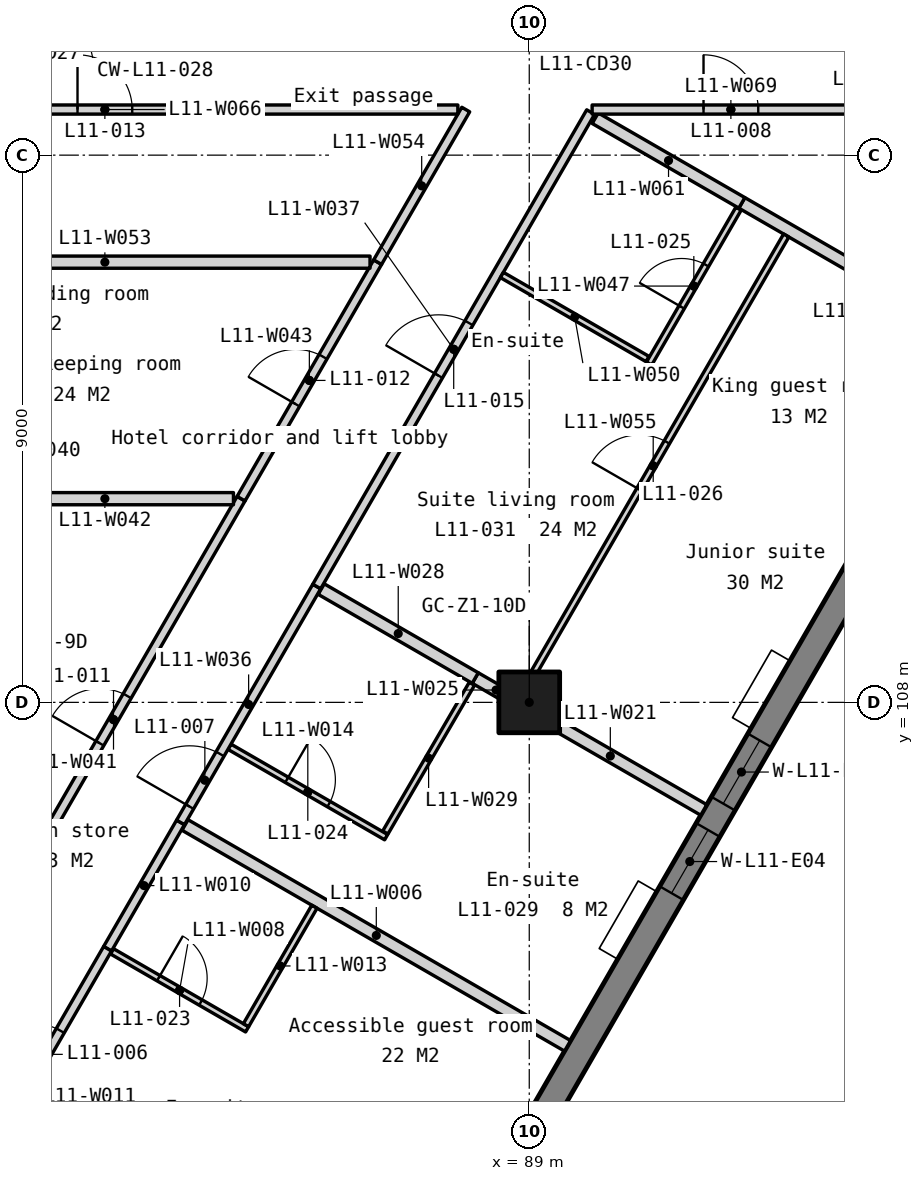
"""IFC4 building model, lengths in metres.
Left out: names, types, materials, properties, quantities, classifications, styles, units other than length and angle.
Written with IfcOpenShell. Run it as: python <this file> out.ifc"""

import sys

from ifc_helpers import new_model, si_unit, direction, frame, frame_2d, origin, origin_2d, place, context, subcontext, project, spatial, polyline, rectangle, outline, extrude, element, fill, save


model = new_model("IFC4")
c1 = context("Model", 3, precision=1e-05, world=origin(), true_north=direction((0.0, 1.0)))
c2 = subcontext(c1, "Body", "Model", "MODEL_VIEW")
j1 = project(units=[si_unit("LENGTHUNIT", "METRE"), si_unit("PLANEANGLEUNIT", "RADIAN")], contexts=[c1])
p1 = place(None, origin())
s1 = spatial("IfcSite", under=j1, at=p1, CompositionType="ELEMENT")
p2 = place(p1, origin())
s2 = spatial("IfcBuilding", under=s1, at=p2, CompositionType="ELEMENT")
p3 = place(p2, frame((0.0, 0.0, 52.5)))
s3 = spatial("IfcBuildingStorey", under=s2, at=p3, CompositionType="ELEMENT", Elevation=52.5)
p4 = place(p3, frame((89.0, 108.0, 0.0), z_axis=(0.0, 0.0, 1.0), x_axis=(1.0, 0.0, 0.0)))
e1 = element("IfcColumn", 1, at=p4, inside=s3, PredefinedType="COLUMN", context=c2, shape_type="SweptSolid", body=[
    extrude(rectangle(XDim=1.0, YDim=1.0, at=origin_2d()), origin(), (0.0, 0.0, 1.0), 3.5),
])
p5 = place(p3, frame((83.105, 90.599, -0.15), z_axis=(0.0, 0.0, 1.0), x_axis=(0.499999201451, 0.866025864826, 0.0)))
e2 = element("IfcWall", 2, at=p5, inside=s3, PredefinedType="SOLIDWALL", context=c2, shape_type="SweptSolid", body=[
    extrude(outline(polyline([(44.8, 0.0), (44.8, 3.5), (0.0, 3.5), (0.0, 0.0), (44.8, 0.0)])), frame((0.0, 0.225, 0.0), z_axis=(0.0, -1.0, 0.0), x_axis=(1.0, 0.0, 0.0)), (0.0, 0.0, 1.0), 0.45),
])
p6 = place(p5, frame((0.722, 0.0, 1.05)))
e3 = element("IfcOpeningElement", 3, at=p6, cuts=e2, PredefinedType="OPENING", context=c2, shape_type="SweptSolid", body=[
    extrude(rectangle(XDim=1.2, YDim=1.5, at=frame_2d((0.6, 0.75))), frame((0.0, 0.235, 0.0), z_axis=(0.0, -1.0, 0.0), x_axis=(1.0, 0.0, 0.0)), (0.0, 0.0, 1.0), 0.47),
])
p7 = place(p5, frame((7.51, 0.0, 1.05)))
e4 = element("IfcOpeningElement", 4, at=p7, cuts=e2, PredefinedType="OPENING", context=c2, shape_type="SweptSolid", body=[
    extrude(rectangle(XDim=1.2, YDim=1.5, at=frame_2d((0.6, 0.75))), frame((0.0, 0.235, 0.0), z_axis=(0.0, -1.0, 0.0), x_axis=(1.0, 0.0, 0.0)), (0.0, 0.0, 1.0), 0.47),
])
p8 = place(p5, frame((9.21, 0.0, 1.05)))
e5 = element("IfcOpeningElement", 5, at=p8, cuts=e2, PredefinedType="OPENING", context=c2, shape_type="SweptSolid", body=[
    extrude(rectangle(XDim=1.2, YDim=1.5, at=frame_2d((0.6, 0.75))), frame((0.0, 0.235, 0.0), z_axis=(0.0, -1.0, 0.0), x_axis=(1.0, 0.0, 0.0)), (0.0, 0.0, 1.0), 0.47),
])
p9 = place(p5, frame((16.47, 0.0, 1.05)))
e6 = element("IfcOpeningElement", 6, at=p9, cuts=e2, PredefinedType="OPENING", context=c2, shape_type="SweptSolid", body=[
    extrude(rectangle(XDim=1.2, YDim=1.5, at=frame_2d((0.6, 0.75))), frame((0.0, 0.235, 0.0), z_axis=(0.0, -1.0, 0.0), x_axis=(1.0, 0.0, 0.0)), (0.0, 0.0, 1.0), 0.47),
])
p10 = place(p5, frame((18.17, 0.0, 1.05)))
e7 = element("IfcOpeningElement", 7, at=p10, cuts=e2, PredefinedType="OPENING", context=c2, shape_type="SweptSolid", body=[
    extrude(rectangle(XDim=1.2, YDim=1.5, at=frame_2d((0.6, 0.75))), frame((0.0, 0.235, 0.0), z_axis=(0.0, -1.0, 0.0), x_axis=(1.0, 0.0, 0.0)), (0.0, 0.0, 1.0), 0.47),
])
p11 = place(p5, frame((25.43, 0.0, 1.05)))
e8 = element("IfcOpeningElement", 8, at=p11, cuts=e2, PredefinedType="OPENING", context=c2, shape_type="SweptSolid", body=[
    extrude(rectangle(XDim=1.2, YDim=1.5, at=frame_2d((0.6, 0.75))), frame((0.0, 0.235, 0.0), z_axis=(0.0, -1.0, 0.0), x_axis=(1.0, 0.0, 0.0)), (0.0, 0.0, 1.0), 0.47),
])
p12 = place(p5, frame((27.13, 0.0, 1.05)))
e9 = element("IfcOpeningElement", 9, at=p12, cuts=e2, PredefinedType="OPENING", context=c2, shape_type="SweptSolid", body=[
    extrude(rectangle(XDim=1.2, YDim=1.5, at=frame_2d((0.6, 0.75))), frame((0.0, 0.235, 0.0), z_axis=(0.0, -1.0, 0.0), x_axis=(1.0, 0.0, 0.0)), (0.0, 0.0, 1.0), 0.47),
])
p13 = place(p5, frame((34.39, 0.0, 1.05)))
e10 = element("IfcOpeningElement", 10, at=p13, cuts=e2, PredefinedType="OPENING", context=c2, shape_type="SweptSolid", body=[
    extrude(rectangle(XDim=1.2, YDim=1.5, at=frame_2d((0.6, 0.75))), frame((0.0, 0.235, 0.0), z_axis=(0.0, -1.0, 0.0), x_axis=(1.0, 0.0, 0.0)), (0.0, 0.0, 1.0), 0.47),
])
p14 = place(p5, frame((36.09, 0.0, 1.05)))
e11 = element("IfcOpeningElement", 11, at=p14, cuts=e2, PredefinedType="OPENING", context=c2, shape_type="SweptSolid", body=[
    extrude(rectangle(XDim=1.2, YDim=1.5, at=frame_2d((0.6, 0.75))), frame((0.0, 0.235, 0.0), z_axis=(0.0, -1.0, 0.0), x_axis=(1.0, 0.0, 0.0)), (0.0, 0.0, 1.0), 0.47),
])
p15 = place(p5, frame((42.878, 0.0, 1.05)))
e12 = element("IfcOpeningElement", 12, at=p15, cuts=e2, PredefinedType="OPENING", context=c2, shape_type="SweptSolid", body=[
    extrude(rectangle(XDim=1.2, YDim=1.5, at=frame_2d((0.6, 0.75))), frame((0.0, 0.235, 0.0), z_axis=(0.0, -1.0, 0.0), x_axis=(1.0, 0.0, 0.0)), (0.0, 0.0, 1.0), 0.47),
])
p16 = place(p3, frame((83.339, 105.983, 0.0), z_axis=(0.0, 0.0, 1.0), x_axis=(0.866023858256, -0.500002676924, 0.0)))
e13 = element("IfcWall", 13, at=p16, inside=s3, PredefinedType="PARTITIONING", context=c2, shape_type="SweptSolid", body=[
    extrude(rectangle(XDim=7.265, YDim=0.2, at=frame_2d((3.633, 0.0))), origin(), (0.0, 0.0, 1.0), 3.35),
])
p17 = place(p3, frame((82.139, 103.905, 0.0), z_axis=(0.0, 0.0, 1.0), x_axis=(0.866014388206, -0.500019079056, 0.0)))
e14 = element("IfcWall", 14, at=p17, inside=s3, PredefinedType="PARTITIONING", context=c2, shape_type="SweptSolid", body=[
    extrude(rectangle(XDim=2.565, YDim=0.1, at=frame_2d((1.282, 0.0))), origin(), (0.0, 0.0, 1.0), 3.35),
])
p18 = place(p17, frame((0.883, 0.0, 0.0)))
e15 = element("IfcOpeningElement", 15, at=p18, cuts=e14, PredefinedType="OPENING", context=c2, shape_type="SweptSolid", body=[
    extrude(rectangle(XDim=0.8, YDim=2.1, at=frame_2d((0.4, 1.05))), frame((0.0, 0.06, 0.0), z_axis=(0.0, -1.0, 0.0), x_axis=(1.0, 0.0, 0.0)), (0.0, 0.0, 1.0), 0.12),
])
p19 = place(p3, frame((82.065, 103.947, 0.0), z_axis=(0.0, 0.0, 1.0), x_axis=(0.500001309137, 0.866024647952, 0.0)))
e16 = element("IfcWall", 16, at=p19, inside=s3, PredefinedType="PARTITIONING", context=c2, shape_type="SweptSolid", body=[
    extrude(rectangle(XDim=2.4, YDim=0.15, at=frame_2d((1.2, 0.0))), origin(), (0.0, 0.0, 1.0), 3.35),
])
p20 = place(p3, frame((80.06, 100.474, 0.0), z_axis=(0.0, 0.0, 1.0), x_axis=(0.499963124258, 0.866046692957, 0.0)))
e17 = element("IfcWall", 17, at=p20, inside=s3, PredefinedType="PARTITIONING", context=c2, shape_type="SweptSolid", body=[
    extrude(rectangle(XDim=4.01, YDim=0.15, at=frame_2d((2.005, 0.0))), origin(), (0.0, 0.0, 1.0), 3.35),
])
p21 = place(p20, frame((1.555, 0.0, 0.0)))
e18 = element("IfcOpeningElement", 18, at=p21, cuts=e17, PredefinedType="OPENING", context=c2, shape_type="SweptSolid", body=[
    extrude(rectangle(XDim=0.9, YDim=2.1, at=frame_2d((0.45, 1.05))), frame((0.0, 0.085, 0.0), z_axis=(0.0, -1.0, 0.0), x_axis=(1.0, 0.0, 0.0)), (0.0, 0.0, 1.0), 0.17),
])
p22 = place(p3, frame((84.342, 102.69, 0.0), z_axis=(0.0, 0.0, 1.0), x_axis=(0.499966648284, 0.866044658551, 0.0)))
e19 = element("IfcWall", 19, at=p22, inside=s3, PredefinedType="PARTITIONING", context=c2, shape_type="SweptSolid", body=[
    extrude(rectangle(XDim=2.25, YDim=0.1, at=frame_2d((1.125, 0.0))), origin(), (0.0, 0.0, 1.0), 3.35),
])
p23 = place(p3, frame((84.07, 107.27, 0.0), z_axis=(0.0, 0.0, 1.0), x_axis=(0.866053027861, -0.499952150643, 0.0)))
e20 = element("IfcWall", 20, at=p23, inside=s3, PredefinedType="PARTITIONING", context=c2, shape_type="SweptSolid", body=[
    extrude(rectangle(XDim=2.975, YDim=0.1, at=frame_2d((1.487, 0.0))), origin(), (0.0, 0.0, 1.0), 3.35),
])
p24 = place(p23, frame((1.087, 0.0, 0.0)))
e21 = element("IfcOpeningElement", 21, at=p24, cuts=e20, PredefinedType="OPENING", context=c2, shape_type="SweptSolid", body=[
    extrude(rectangle(XDim=0.8, YDim=2.1, at=frame_2d((0.4, 1.05))), frame((0.0, 0.06, 0.0), z_axis=(0.0, -1.0, 0.0), x_axis=(1.0, 0.0, 0.0)), (0.0, 0.0, 1.0), 0.12),
])
p25 = place(p3, frame((88.796, 108.005, 0.0), z_axis=(0.0, 0.0, 1.0), x_axis=(0.8660424351, -0.499970499736, 0.0)))
e22 = element("IfcWall", 22, at=p25, inside=s3, PredefinedType="PARTITIONING", context=c2, shape_type="SweptSolid", body=[
    extrude(rectangle(XDim=3.55, YDim=0.2, at=frame_2d((1.775, 0.0))), origin(), (0.0, 0.0, 1.0), 3.35),
])
p26 = place(p3, frame((88.112, 108.4, 0.0), z_axis=(0.0, 0.0, 1.0), x_axis=(0.865989998118, -0.500061319399, 0.0)))
e23 = element("IfcWall", 23, at=p26, inside=s3, PredefinedType="PARTITIONING", context=c2, shape_type="SweptSolid", body=[
    extrude(rectangle(XDim=0.79, YDim=0.2, at=frame_2d((0.395, 0.0))), origin(), (0.0, 0.0, 1.0), 3.35),
])
p27 = place(p3, frame((85.579, 109.863, 0.0), z_axis=(0.0, 0.0, 1.0), x_axis=(0.86601045545, -0.500025890382, 0.0)))
e24 = element("IfcWall", 24, at=p27, inside=s3, PredefinedType="PARTITIONING", context=c2, shape_type="SweptSolid", body=[
    extrude(rectangle(XDim=2.925, YDim=0.2, at=frame_2d((1.462, 0.0))), origin(), (0.0, 0.0, 1.0), 3.35),
])
p28 = place(p3, frame((86.633, 105.859, 0.0), z_axis=(0.0, 0.0, 1.0), x_axis=(0.502878343763, 0.864357201263, 0.0)))
e25 = element("IfcWall", 25, at=p28, inside=s3, PredefinedType="PARTITIONING", context=c2, shape_type="SweptSolid", body=[
    extrude(rectangle(XDim=2.83, YDim=0.1, at=frame_2d((1.415, 0.0))), origin(), (0.0, 0.0, 1.0), 3.35),
])
p29 = place(p3, frame((83.265, 106.026, 0.0), z_axis=(0.0, 0.0, 1.0), x_axis=(0.499989762656, 0.866031314237, 0.0)))
e26 = element("IfcWall", 26, at=p29, inside=s3, PredefinedType="PARTITIONING", context=c2, shape_type="SweptSolid", body=[
    extrude(rectangle(XDim=4.48, YDim=0.15, at=frame_2d((2.24, 0.0))), origin(), (0.0, 0.0, 1.0), 3.35),
])
p30 = place(p29, frame((0.3, 0.0, 0.0)))
e27 = element("IfcOpeningElement", 27, at=p30, cuts=e26, PredefinedType="OPENING", context=c2, shape_type="SweptSolid", body=[
    extrude(rectangle(XDim=1.0, YDim=2.1, at=frame_2d((0.5, 1.05))), frame((0.0, 0.085, 0.0), z_axis=(0.0, -1.0, 0.0), x_axis=(1.0, 0.0, 0.0)), (0.0, 0.0, 1.0), 0.17),
])
p31 = place(p3, frame((85.505, 109.906, 0.0), z_axis=(0.0, 0.0, 1.0), x_axis=(0.500017993482, 0.866015014994, 0.0)))
e28 = element("IfcWall", 28, at=p31, inside=s3, PredefinedType="PARTITIONING", context=c2, shape_type="SweptSolid", body=[
    extrude(rectangle(XDim=9.01, YDim=0.15, at=frame_2d((4.505, 0.0))), origin(), (0.0, 0.0, 1.0), 3.35),
])
p32 = place(p31, frame((4.005, 0.0, 0.0)))
e29 = element("IfcOpeningElement", 29, at=p32, cuts=e28, PredefinedType="OPENING", context=c2, shape_type="SweptSolid", body=[
    extrude(rectangle(XDim=1.0, YDim=2.1, at=frame_2d((0.5, 1.05))), frame((0.0, 0.085, 0.0), z_axis=(0.0, -1.0, 0.0), x_axis=(1.0, 0.0, 0.0)), (0.0, 0.0, 1.0), 0.17),
])
p33 = place(p3, frame((80.065, 104.083, 0.0), z_axis=(0.0, 0.0, 1.0), x_axis=(0.49999109456, 0.866030545282, 0.0)))
e30 = element("IfcWall", 30, at=p33, inside=s3, PredefinedType="PARTITIONING", context=c2, shape_type="SweptSolid", body=[
    extrude(rectangle(XDim=8.391, YDim=0.15, at=frame_2d((4.196, 0.0))), origin(), (0.0, 0.0, 1.0), 3.35),
])
p34 = place(p33, frame((3.746, 0.0, 0.0)))
e31 = element("IfcOpeningElement", 31, at=p34, cuts=e30, PredefinedType="OPENING", context=c2, shape_type="SweptSolid", body=[
    extrude(rectangle(XDim=0.9, YDim=2.1, at=frame_2d((0.45, 1.05))), frame((0.0, 0.085, 0.0), z_axis=(0.0, -1.0, 0.0), x_axis=(1.0, 0.0, 0.0)), (0.0, 0.0, 1.0), 0.17),
])
p35 = place(p3, frame((79.906, 111.35, 0.0), z_axis=(0.0, 0.0, 1.0), x_axis=(1.0, 0.0, 0.0)))
e32 = element("IfcWall", 32, at=p35, inside=s3, PredefinedType="PARTITIONING", context=c2, shape_type="SweptSolid", body=[
    extrude(rectangle(XDim=4.229, YDim=0.2, at=frame_2d((2.115, 0.0))), origin(), (0.0, 0.0, 1.0), 3.35),
])
p36 = place(p3, frame((84.26, 111.35, 0.0), z_axis=(0.0, 0.0, 1.0), x_axis=(0.500003186274, 0.866023564181, 0.0)))
e33 = element("IfcWall", 33, at=p36, inside=s3, PredefinedType="PARTITIONING", context=c2, shape_type="SweptSolid", body=[
    extrude(rectangle(XDim=4.492, YDim=0.15, at=frame_2d((2.246, 0.0))), origin(), (0.0, 0.0, 1.0), 3.35),
])
p37 = place(p36, frame((1.796, 0.0, 0.0)))
e34 = element("IfcOpeningElement", 34, at=p37, cuts=e33, PredefinedType="OPENING", context=c2, shape_type="SweptSolid", body=[
    extrude(rectangle(XDim=0.9, YDim=2.1, at=frame_2d((0.45, 1.05))), frame((0.0, 0.085, 0.0), z_axis=(0.0, -1.0, 0.0), x_axis=(1.0, 0.0, 0.0)), (0.0, 0.0, 1.0), 0.17),
])
p38 = place(p3, frame((90.971, 113.574, 0.0), z_axis=(0.0, 0.0, 1.0), x_axis=(0.499988418424, 0.866032090307, 0.0)))
e35 = element("IfcWall", 35, at=p38, inside=s3, PredefinedType="PARTITIONING", context=c2, shape_type="SweptSolid", body=[
    extrude(rectangle(XDim=2.94, YDim=0.1, at=frame_2d((1.47, 0.0))), origin(), (0.0, 0.0, 1.0), 3.35),
])
p39 = place(p38, frame((1.07, 0.0, 0.0)))
e36 = element("IfcOpeningElement", 36, at=p39, cuts=e35, PredefinedType="OPENING", context=c2, shape_type="SweptSolid", body=[
    extrude(rectangle(XDim=0.8, YDim=2.1, at=frame_2d((0.4, 1.05))), frame((0.0, 0.06, 0.0), z_axis=(0.0, -1.0, 0.0), x_axis=(1.0, 0.0, 0.0)), (0.0, 0.0, 1.0), 0.12),
])
p40 = place(p3, frame((92.497, 116.215, 0.0), z_axis=(0.0, 0.0, 1.0), x_axis=(0.866012907634, -0.500021643343, 0.0)))
e37 = element("IfcWall", 37, at=p40, inside=s3, PredefinedType="PARTITIONING", context=c2, shape_type="SweptSolid", body=[
    extrude(rectangle(XDim=4.45, YDim=0.2, at=frame_2d((2.225, 0.0))), origin(), (0.0, 0.0, 1.0), 3.35),
])
p41 = place(p3, frame((88.55, 115.03, 0.0), z_axis=(0.0, 0.0, 1.0), x_axis=(0.866012076814, -0.50002308228, 0.0)))
e38 = element("IfcWall", 38, at=p41, inside=s3, PredefinedType="PARTITIONING", context=c2, shape_type="SweptSolid", body=[
    extrude(rectangle(XDim=2.765, YDim=0.1, at=frame_2d((1.382, 0.0))), origin(), (0.0, 0.0, 1.0), 3.35),
])
p42 = place(p3, frame((77.66, 115.24, 0.0), z_axis=(0.0, 0.0, 1.0), x_axis=(1.0, 0.0, 0.0)))
e39 = element("IfcWall", 39, at=p42, inside=s3, PredefinedType="PARTITIONING", context=c2, shape_type="SweptSolid", body=[
    extrude(rectangle(XDim=8.721, YDim=0.2, at=frame_2d((4.361, 0.0))), origin(), (0.0, 0.0, 1.0), 3.35),
])
p43 = place(p3, frame((86.506, 115.24, 0.0), z_axis=(0.0, 0.0, 1.0), x_axis=(0.500016544581, 0.866015851556, 0.0)))
e40 = element("IfcWall", 40, at=p43, inside=s3, PredefinedType="PARTITIONING", context=c2, shape_type="SweptSolid", body=[
    extrude(rectangle(XDim=2.898, YDim=0.15, at=frame_2d((1.449, 0.0))), origin(), (0.0, 0.0, 1.0), 3.35),
])
p44 = place(p3, frame((88.851, 108.101, 0.0), z_axis=(0.0, 0.0, 1.0), x_axis=(0.500004234368, 0.866022959057, 0.0)))
e41 = element("IfcWall", 41, at=p44, inside=s3, PredefinedType="PARTITIONING", context=c2, shape_type="SweptSolid", body=[
    extrude(rectangle(XDim=8.75, YDim=0.1, at=frame_2d((4.375, 0.0))), origin(), (0.0, 0.0, 1.0), 3.35),
])
p45 = place(p44, frame((3.925, 0.0, 0.0)))
e42 = element("IfcOpeningElement", 42, at=p45, cuts=e41, PredefinedType="OPENING", context=c2, shape_type="SweptSolid", body=[
    extrude(rectangle(XDim=0.9, YDim=2.1, at=frame_2d((0.45, 1.05))), frame((0.0, 0.06, 0.0), z_axis=(0.0, -1.0, 0.0), x_axis=(1.0, 0.0, 0.0)), (0.0, 0.0, 1.0), 0.12),
])
p46 = place(p3, frame((90.085, 117.608, 0.0), z_axis=(0.0, 0.0, 1.0), x_axis=(0.866011863948, -0.500023450952, 0.0)))
e43 = element("IfcWall", 43, at=p46, inside=s3, PredefinedType="PARTITIONING", context=c2, shape_type="SweptSolid", body=[
    extrude(rectangle(XDim=2.785, YDim=0.2, at=frame_2d((1.393, 0.0))), origin(), (0.0, 0.0, 1.0), 3.35),
])
p47 = place(p3, frame((76.216, 117.75, 0.0), z_axis=(0.0, 0.0, 1.0), x_axis=(1.0, 0.0, 0.0)))
e44 = element("IfcWall", 44, at=p47, inside=s3, PredefinedType="PARTITIONING", context=c2, shape_type="SweptSolid", body=[
    extrude(rectangle(XDim=11.61, YDim=0.15, at=frame_2d((5.805, 0.0))), origin(), (0.0, 0.0, 1.0), 2.938),
])
p48 = place(p47, frame((5.355, 0.0, 0.0)))
e45 = element("IfcOpeningElement", 45, at=p48, cuts=e44, PredefinedType="OPENING", context=c2, shape_type="SweptSolid", body=[
    extrude(rectangle(XDim=0.9, YDim=2.1, at=frame_2d((0.45, 1.05))), frame((0.0, 0.085, 0.0), z_axis=(0.0, -1.0, 0.0), x_axis=(1.0, 0.0, 0.0)), (0.0, 0.0, 1.0), 0.17),
])
p49 = place(p3, frame((90.034, 117.75, 0.0), z_axis=(0.0, 0.0, 1.0), x_axis=(1.0, 0.0, 0.0)))
e46 = element("IfcWall", 46, at=p49, inside=s3, PredefinedType="PARTITIONING", context=c2, shape_type="SweptSolid", body=[
    extrude(rectangle(XDim=4.564, YDim=0.15, at=frame_2d((2.282, 0.0))), origin(), (0.0, 0.0, 1.0), 3.35),
])
p50 = place(p49, frame((1.832, 0.0, 0.0)))
e47 = element("IfcOpeningElement", 47, at=p50, cuts=e46, PredefinedType="OPENING", context=c2, shape_type="SweptSolid", body=[
    extrude(rectangle(XDim=0.9, YDim=2.1, at=frame_2d((0.45, 1.05))), frame((0.0, 0.085, 0.0), z_axis=(0.0, -1.0, 0.0), x_axis=(1.0, 0.0, 0.0)), (0.0, 0.0, 1.0), 0.17),
])
p51 = place(p9, origin())
e48 = element("IfcWindow", 48, at=p51, inside=s3, PartitioningType="SINGLE_PANEL", PredefinedType="WINDOW", context=c2, shape_type="SweptSolid", body=[
    extrude(rectangle(XDim=1.2, YDim=1.5, at=frame_2d((0.6, 0.75))), frame((0.0, 0.03, 0.0), z_axis=(0.0, -1.0, 0.0), x_axis=(1.0, 0.0, 0.0)), (0.0, 0.0, 1.0), 0.06),
])
fill(e6, e48)
p52 = place(p10, origin())
e49 = element("IfcWindow", 49, at=p52, inside=s3, PartitioningType="SINGLE_PANEL", PredefinedType="WINDOW", context=c2, shape_type="SweptSolid", body=[
    extrude(rectangle(XDim=1.2, YDim=1.5, at=frame_2d((0.6, 0.75))), frame((0.0, 0.03, 0.0), z_axis=(0.0, -1.0, 0.0), x_axis=(1.0, 0.0, 0.0)), (0.0, 0.0, 1.0), 0.06),
])
fill(e7, e49)
p53 = place(p21, origin())
e50 = element("IfcDoor", 50, at=p53, inside=s3, OperationType="SINGLE_SWING_LEFT", PredefinedType="DOOR", context=c2, shape_type="SweptSolid", body=[
    extrude(rectangle(XDim=0.9, YDim=2.1, at=frame_2d((0.45, 1.05))), frame((0.0, 0.025, 0.0), z_axis=(0.0, -1.0, 0.0), x_axis=(1.0, 0.0, 0.0)), (0.0, 0.0, 1.0), 0.05),
])
fill(e18, e50)
p54 = place(p30, origin())
e51 = element("IfcDoor", 51, at=p54, inside=s3, OperationType="SINGLE_SWING_LEFT", PredefinedType="DOOR", context=c2, shape_type="SweptSolid", body=[
    extrude(rectangle(XDim=1.0, YDim=2.1, at=frame_2d((0.5, 1.05))), frame((0.0, 0.025, 0.0), z_axis=(0.0, -1.0, 0.0), x_axis=(1.0, 0.0, 0.0)), (0.0, 0.0, 1.0), 0.05),
])
fill(e27, e51)
p55 = place(p50, origin())
e52 = element("IfcDoor", 52, at=p55, inside=s3, OperationType="SINGLE_SWING_LEFT", PredefinedType="DOOR", context=c2, shape_type="SweptSolid", body=[
    extrude(rectangle(XDim=0.9, YDim=2.1, at=frame_2d((0.45, 1.05))), frame((0.0, 0.025, 0.0), z_axis=(0.0, -1.0, 0.0), x_axis=(1.0, 0.0, 0.0)), (0.0, 0.0, 1.0), 0.05),
])
fill(e47, e52)
p56 = place(p34, origin())
e53 = element("IfcDoor", 53, at=p56, inside=s3, OperationType="SINGLE_SWING_LEFT", PredefinedType="DOOR", context=c2, shape_type="SweptSolid", body=[
    extrude(rectangle(XDim=0.9, YDim=2.1, at=frame_2d((0.45, 1.05))), frame((0.0, 0.025, 0.0), z_axis=(0.0, -1.0, 0.0), x_axis=(1.0, 0.0, 0.0)), (0.0, 0.0, 1.0), 0.05),
])
fill(e31, e53)
p57 = place(p37, origin())
e54 = element("IfcDoor", 54, at=p57, inside=s3, OperationType="SINGLE_SWING_LEFT", PredefinedType="DOOR", context=c2, shape_type="SweptSolid", body=[
    extrude(rectangle(XDim=0.9, YDim=2.1, at=frame_2d((0.45, 1.05))), frame((0.0, 0.025, 0.0), z_axis=(0.0, -1.0, 0.0), x_axis=(1.0, 0.0, 0.0)), (0.0, 0.0, 1.0), 0.05),
])
fill(e34, e54)
p58 = place(p48, origin())
e55 = element("IfcDoor", 55, at=p58, inside=s3, OperationType="SINGLE_SWING_LEFT", PredefinedType="DOOR", context=c2, shape_type="SweptSolid", body=[
    extrude(rectangle(XDim=0.9, YDim=2.1, at=frame_2d((0.45, 1.05))), frame((0.0, 0.025, 0.0), z_axis=(0.0, -1.0, 0.0), x_axis=(1.0, 0.0, 0.0)), (0.0, 0.0, 1.0), 0.05),
])
fill(e45, e55)
p59 = place(p32, origin())
e56 = element("IfcDoor", 56, at=p59, inside=s3, OperationType="SINGLE_SWING_LEFT", PredefinedType="DOOR", context=c2, shape_type="SweptSolid", body=[
    extrude(rectangle(XDim=1.0, YDim=2.1, at=frame_2d((0.5, 1.05))), frame((0.0, 0.025, 0.0), z_axis=(0.0, -1.0, 0.0), x_axis=(1.0, 0.0, 0.0)), (0.0, 0.0, 1.0), 0.05),
])
fill(e29, e56)
p60 = place(p18, origin())
e57 = element("IfcDoor", 57, at=p60, inside=s3, OperationType="SINGLE_SWING_LEFT", PredefinedType="DOOR", context=c2, shape_type="SweptSolid", body=[
    extrude(rectangle(XDim=0.8, YDim=2.1, at=frame_2d((0.4, 1.05))), frame((0.0, 0.025, 0.0), z_axis=(0.0, -1.0, 0.0), x_axis=(1.0, 0.0, 0.0)), (0.0, 0.0, 1.0), 0.05),
])
fill(e15, e57)
p61 = place(p24, origin())
e58 = element("IfcDoor", 58, at=p61, inside=s3, OperationType="SINGLE_SWING_LEFT", PredefinedType="DOOR", context=c2, shape_type="SweptSolid", body=[
    extrude(rectangle(XDim=0.8, YDim=2.1, at=frame_2d((0.4, 1.05))), frame((0.0, 0.025, 0.0), z_axis=(0.0, -1.0, 0.0), x_axis=(1.0, 0.0, 0.0)), (0.0, 0.0, 1.0), 0.05),
])
fill(e21, e58)
p62 = place(p39, origin())
e59 = element("IfcDoor", 59, at=p62, inside=s3, OperationType="SINGLE_SWING_LEFT", PredefinedType="DOOR", context=c2, shape_type="SweptSolid", body=[
    extrude(rectangle(XDim=0.8, YDim=2.1, at=frame_2d((0.4, 1.05))), frame((0.0, 0.025, 0.0), z_axis=(0.0, -1.0, 0.0), x_axis=(1.0, 0.0, 0.0)), (0.0, 0.0, 1.0), 0.05),
])
fill(e36, e59)
p63 = place(p45, origin())
e60 = element("IfcDoor", 60, at=p63, inside=s3, OperationType="SINGLE_SWING_LEFT", PredefinedType="DOOR", context=c2, shape_type="SweptSolid", body=[
    extrude(rectangle(XDim=0.9, YDim=2.1, at=frame_2d((0.45, 1.05))), frame((0.0, 0.025, 0.0), z_axis=(0.0, -1.0, 0.0), x_axis=(1.0, 0.0, 0.0)), (0.0, 0.0, 1.0), 0.05),
])
fill(e42, e60)
save(model, sys.argv[1])
